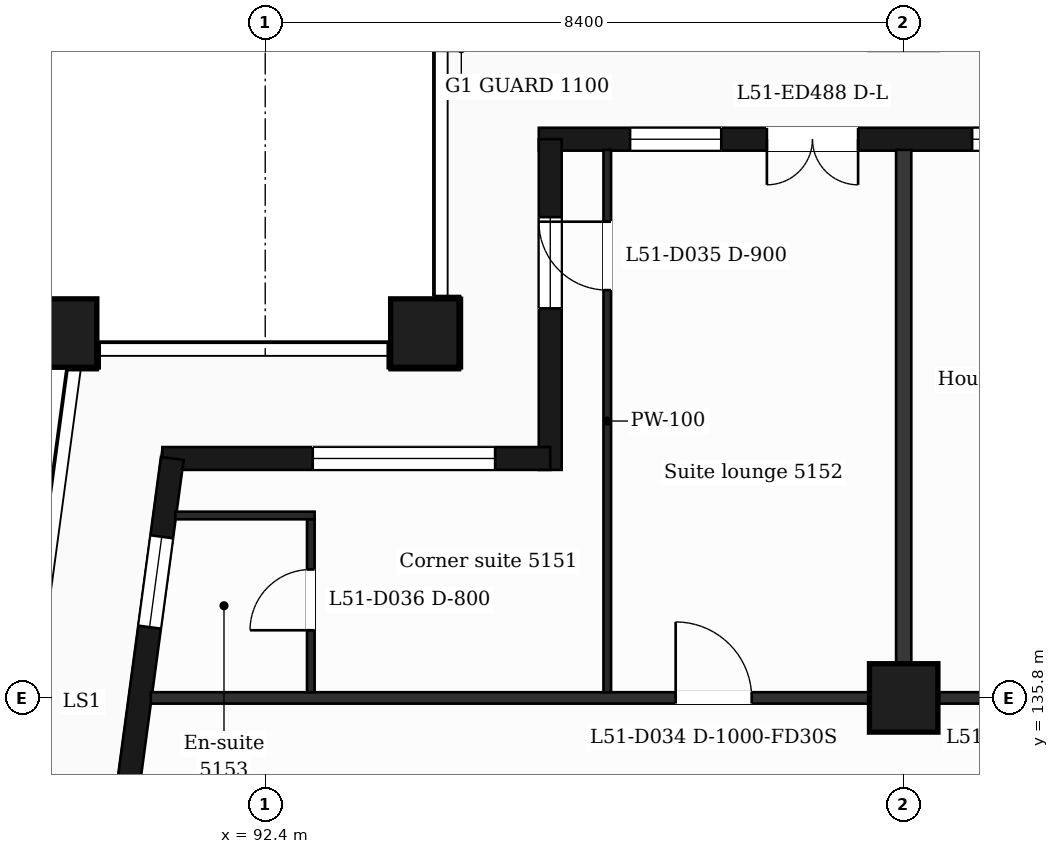
"""IFC4 building model, lengths in metres.
Left out: names, types, materials, properties, quantities, classifications, styles, units other than length and angle.
Written with IfcOpenShell. Run it as: python <this file> out.ifc"""

import sys

from ifc_helpers import new_model, si_unit, direction, frame, frame_2d, origin, origin_2d, place, context, subcontext, project, spatial, rectangle, extrude, element, fill, save


model = new_model("IFC4")
c1 = context("Model", 3, precision=1e-05, world=origin(), true_north=direction((0.0, 1.0)))
c2 = subcontext(c1, "Body", "Model", "MODEL_VIEW")
j1 = project(units=[si_unit("LENGTHUNIT", "METRE"), si_unit("PLANEANGLEUNIT", "RADIAN")], contexts=[c1])
p1 = place(None, origin())
s1 = spatial("IfcSite", under=j1, at=p1, CompositionType="ELEMENT")
p2 = place(p1, origin())
s2 = spatial("IfcBuilding", under=s1, at=p2, CompositionType="ELEMENT")
p3 = place(p2, frame((0.0, 0.0, 213.3)))
s3 = spatial("IfcBuildingStorey", under=s2, at=p3, CompositionType="ELEMENT", Elevation=213.3)
for number, where, z_axis, x_axis in (
    (1, (94.5, 140.6, 0.0), (0.0, 0.0, 1.0), (1.0, 0.0, 0.0)),
    (2, (89.735, 140.6, 0.0), (0.0, 0.0, 1.0), (1.0, 0.0, 0.0)),
    (3, (100.8, 135.8, 0.0), (0.0, 0.0, 1.0), (1.0, 0.0, 0.0)),
):
    element("IfcColumn", number, at=place(p3, frame(where, z_axis=z_axis, x_axis=x_axis)), inside=s3, PredefinedType="COLUMN", context=c2, shape_type="SweptSolid", body=[
        extrude(rectangle(XDim=0.9, YDim=0.9, at=origin_2d()), origin(), (0.0, 0.0, 1.0), 3.7),
    ])
p4 = place(p3, frame((112.5, 143.15, 0.0), z_axis=(0.0, 0.0, 1.0), x_axis=(-1.0, 0.0, 0.0)))
e4 = element("IfcWall", 4, at=p4, inside=s3, PredefinedType="SOLIDWALL", context=c2, shape_type="SweptSolid", body=[
    extrude(rectangle(XDim=16.5, YDim=0.3, at=frame_2d((8.25, 0.0))), origin(), (0.0, 0.0, 1.0), 3.38),
])
p5 = place(p4, frame((1.1, 0.0, 0.9)))
e5 = element("IfcOpeningElement", 5, at=p5, cuts=e4, PredefinedType="OPENING", context=c2, shape_type="SweptSolid", body=[
    extrude(rectangle(XDim=1.2, YDim=2.1, at=frame_2d((0.6, 1.05))), frame((0.0, 0.16, 0.0), z_axis=(0.0, -1.0, 0.0), x_axis=(1.0, 0.0, 0.0)), (0.0, 0.0, 1.0), 0.32),
])
p6 = place(p4, frame((4.2, 0.0, 0.9)))
e6 = element("IfcOpeningElement", 6, at=p6, cuts=e4, PredefinedType="OPENING", context=c2, shape_type="SweptSolid", body=[
    extrude(rectangle(XDim=2.4, YDim=2.1, at=frame_2d((1.2, 1.05))), frame((0.0, 0.16, 0.0), z_axis=(0.0, -1.0, 0.0), x_axis=(1.0, 0.0, 0.0)), (0.0, 0.0, 1.0), 0.32),
])
p7 = place(p4, frame((8.4, 0.0, 0.9)))
e7 = element("IfcOpeningElement", 7, at=p7, cuts=e4, PredefinedType="OPENING", context=c2, shape_type="SweptSolid", body=[
    extrude(rectangle(XDim=2.4, YDim=2.1, at=frame_2d((1.2, 1.05))), frame((0.0, 0.16, 0.0), z_axis=(0.0, -1.0, 0.0), x_axis=(1.0, 0.0, 0.0)), (0.0, 0.0, 1.0), 0.32),
])
p8 = place(p4, frame((12.3, 0.0, 0.0)))
e8 = element("IfcOpeningElement", 8, at=p8, cuts=e4, PredefinedType="OPENING", context=c2, shape_type="SweptSolid", body=[
    extrude(rectangle(XDim=1.2, YDim=2.4, at=frame_2d((0.6, 1.2))), frame((0.0, 0.16, 0.0), z_axis=(0.0, -1.0, 0.0), x_axis=(1.0, 0.0, 0.0)), (0.0, 0.0, 1.0), 0.32),
])
p9 = place(p4, frame((14.1, 0.0, 0.9)))
e9 = element("IfcOpeningElement", 9, at=p9, cuts=e4, PredefinedType="OPENING", context=c2, shape_type="SweptSolid", body=[
    extrude(rectangle(XDim=1.2, YDim=2.1, at=frame_2d((0.6, 1.05))), frame((0.0, 0.16, 0.0), z_axis=(0.0, -1.0, 0.0), x_axis=(1.0, 0.0, 0.0)), (0.0, 0.0, 1.0), 0.32),
])
p10 = place(p3, frame((96.15, 143.15, 0.0), z_axis=(0.0, 0.0, 1.0), x_axis=(0.0, -1.0, 0.0)))
e10 = element("IfcWall", 10, at=p10, inside=s3, PredefinedType="SOLIDWALL", context=c2, shape_type="SweptSolid", body=[
    extrude(rectangle(XDim=4.35, YDim=0.3, at=frame_2d((2.175, 0.0))), origin(), (0.0, 0.0, 1.0), 3.38),
])
p11 = place(p10, frame((1.025, 0.0, 0.9)))
e11 = element("IfcOpeningElement", 11, at=p11, cuts=e10, PredefinedType="OPENING", context=c2, shape_type="SweptSolid", body=[
    extrude(rectangle(XDim=1.2, YDim=2.1, at=frame_2d((0.6, 1.05))), frame((0.0, 0.16, 0.0), z_axis=(0.0, -1.0, 0.0), x_axis=(1.0, 0.0, 0.0)), (0.0, 0.0, 1.0), 0.32),
])
p12 = place(p3, frame((96.15, 138.95, 0.0), z_axis=(0.0, 0.0, 1.0), x_axis=(-1.0, 0.0, 0.0)))
e12 = element("IfcWall", 12, at=p12, inside=s3, PredefinedType="SOLIDWALL", context=c2, shape_type="SweptSolid", body=[
    extrude(rectangle(XDim=5.104, YDim=0.3, at=frame_2d((2.552, 0.0))), origin(), (0.0, 0.0, 1.0), 3.38),
])
p13 = place(p12, frame((0.725, 0.0, 0.9)))
e13 = element("IfcOpeningElement", 13, at=p13, cuts=e12, PredefinedType="OPENING", context=c2, shape_type="SweptSolid", body=[
    extrude(rectangle(XDim=2.4, YDim=2.1, at=frame_2d((1.2, 1.05))), frame((0.0, 0.16, 0.0), z_axis=(0.0, -1.0, 0.0), x_axis=(1.0, 0.0, 0.0)), (0.0, 0.0, 1.0), 0.32),
])
p14 = place(p3, frame((91.177, 138.95, 0.0), z_axis=(0.0, 0.0, 1.0), x_axis=(-0.133426664613, -0.991058689065, 0.0)))
e14 = element("IfcWall", 14, at=p14, inside=s3, PredefinedType="SOLIDWALL", context=c2, shape_type="SweptSolid", body=[
    extrude(rectangle(XDim=6.609, YDim=0.3, at=frame_2d((3.305, 0.0))), origin(), (0.0, 0.0, 1.0), 3.38),
])
p15 = place(p14, frame((1.039, 0.0, 0.9)))
e15 = element("IfcOpeningElement", 15, at=p15, cuts=e14, PredefinedType="OPENING", context=c2, shape_type="SweptSolid", body=[
    extrude(rectangle(XDim=1.2, YDim=2.1, at=frame_2d((0.6, 1.05))), frame((0.0, 0.16, 0.0), z_axis=(0.0, -1.0, 0.0), x_axis=(1.0, 0.0, 0.0)), (0.0, 0.0, 1.0), 0.32),
])
p16 = place(p14, frame((4.294, 0.0, 0.0)))
e16 = element("IfcOpeningElement", 16, at=p16, cuts=e14, PredefinedType="OPENING", context=c2, shape_type="SweptSolid", body=[
    extrude(rectangle(XDim=1.2, YDim=2.4, at=frame_2d((0.6, 1.2))), frame((0.0, 0.16, 0.0), z_axis=(0.0, -1.0, 0.0), x_axis=(1.0, 0.0, 0.0)), (0.0, 0.0, 1.0), 0.32),
])
p17 = place(p3, frame((90.895, 135.8, 0.0), z_axis=(0.0, 0.0, 1.0), x_axis=(1.0, 0.0, 0.0)))
e17 = element("IfcWall", 17, at=p17, inside=s3, PredefinedType="PARTITIONING", context=c2, shape_type="SweptSolid", body=[
    extrude(rectangle(XDim=45.011, YDim=0.15, at=frame_2d((22.505, 0.0))), origin(), (0.0, 0.0, 1.0), 3.38),
])
p18 = place(p17, frame((6.906, 0.0, 0.0)))
e18 = element("IfcOpeningElement", 18, at=p18, cuts=e17, PredefinedType="OPENING", context=c2, shape_type="SweptSolid", body=[
    extrude(rectangle(XDim=1.0, YDim=2.1, at=frame_2d((0.5, 1.05))), frame((0.0, 0.085, 0.0), z_axis=(0.0, -1.0, 0.0), x_axis=(1.0, 0.0, 0.0)), (0.0, 0.0, 1.0), 0.17),
])
p19 = place(p17, frame((11.531, 0.0, 0.0)))
e19 = element("IfcOpeningElement", 19, at=p19, cuts=e17, PredefinedType="OPENING", context=c2, shape_type="SweptSolid", body=[
    extrude(rectangle(XDim=0.95, YDim=2.1, at=frame_2d((0.475, 1.05))), frame((0.0, 0.085, 0.0), z_axis=(0.0, -1.0, 0.0), x_axis=(1.0, 0.0, 0.0)), (0.0, 0.0, 1.0), 0.17),
])
p20 = place(p17, frame((16.667, 0.0, 0.0)))
e20 = element("IfcOpeningElement", 20, at=p20, cuts=e17, PredefinedType="OPENING", context=c2, shape_type="SweptSolid", body=[
    extrude(rectangle(XDim=0.95, YDim=2.1, at=frame_2d((0.475, 1.05))), frame((0.0, 0.085, 0.0), z_axis=(0.0, -1.0, 0.0), x_axis=(1.0, 0.0, 0.0)), (0.0, 0.0, 1.0), 0.17),
])
p21 = place(p17, frame((21.281, 0.0, 0.0)))
e21 = element("IfcOpeningElement", 21, at=p21, cuts=e17, PredefinedType="OPENING", context=c2, shape_type="SweptSolid", body=[
    extrude(rectangle(XDim=0.95, YDim=2.1, at=frame_2d((0.475, 1.05))), frame((0.0, 0.085, 0.0), z_axis=(0.0, -1.0, 0.0), x_axis=(1.0, 0.0, 0.0)), (0.0, 0.0, 1.0), 0.17),
])
p22 = place(p17, frame((28.73, 0.0, 0.0)))
e22 = element("IfcOpeningElement", 22, at=p22, cuts=e17, PredefinedType="OPENING", context=c2, shape_type="SweptSolid", body=[
    extrude(rectangle(XDim=1.0, YDim=2.1, at=frame_2d((0.5, 1.05))), frame((0.0, 0.085, 0.0), z_axis=(0.0, -1.0, 0.0), x_axis=(1.0, 0.0, 0.0)), (0.0, 0.0, 1.0), 0.17),
])
p23 = place(p17, frame((39.814, 0.0, 0.0)))
e23 = element("IfcOpeningElement", 23, at=p23, cuts=e17, PredefinedType="OPENING", context=c2, shape_type="SweptSolid", body=[
    extrude(rectangle(XDim=0.95, YDim=2.1, at=frame_2d((0.475, 1.05))), frame((0.0, 0.085, 0.0), z_axis=(0.0, -1.0, 0.0), x_axis=(1.0, 0.0, 0.0)), (0.0, 0.0, 1.0), 0.17),
])
p24 = place(p3, frame((91.218, 138.2, 0.0), z_axis=(0.0, 0.0, 1.0), x_axis=(1.0, 0.0, 0.0)))
e24 = element("IfcWall", 24, at=p24, inside=s3, PredefinedType="PARTITIONING", context=c2, shape_type="SweptSolid", body=[
    extrude(rectangle(XDim=1.832, YDim=0.1, at=frame_2d((0.916, 0.0))), origin(), (0.0, 0.0, 1.0), 3.38),
])
p25 = place(p3, frame((93.0, 135.875, 0.0), z_axis=(0.0, 0.0, 1.0), x_axis=(0.0, 1.0, 0.0)))
e25 = element("IfcWall", 25, at=p25, inside=s3, PredefinedType="PARTITIONING", context=c2, shape_type="SweptSolid", body=[
    extrude(rectangle(XDim=2.275, YDim=0.1, at=frame_2d((1.137, 0.0))), origin(), (0.0, 0.0, 1.0), 3.38),
])
p26 = place(p25, frame((0.815, 0.0, 0.0)))
e26 = element("IfcOpeningElement", 26, at=p26, cuts=e25, PredefinedType="OPENING", context=c2, shape_type="SweptSolid", body=[
    extrude(rectangle(XDim=0.8, YDim=2.1, at=frame_2d((0.4, 1.05))), frame((0.0, 0.06, 0.0), z_axis=(0.0, -1.0, 0.0), x_axis=(1.0, 0.0, 0.0)), (0.0, 0.0, 1.0), 0.12),
])
p27 = place(p3, frame((96.9, 135.875, 0.0), z_axis=(0.0, 0.0, 1.0), x_axis=(0.0, 1.0, 0.0)))
e27 = element("IfcWall", 27, at=p27, inside=s3, PredefinedType="PARTITIONING", context=c2, shape_type="SweptSolid", body=[
    extrude(rectangle(XDim=7.135, YDim=0.1, at=frame_2d((3.567, 0.0))), origin(), (0.0, 0.0, 1.0), 3.38),
])
p28 = place(p27, frame((5.29, 0.0, 0.0)))
e28 = element("IfcOpeningElement", 28, at=p28, cuts=e27, PredefinedType="OPENING", context=c2, shape_type="SweptSolid", body=[
    extrude(rectangle(XDim=0.9, YDim=2.1, at=frame_2d((0.45, 1.05))), frame((0.0, 0.06, 0.0), z_axis=(0.0, -1.0, 0.0), x_axis=(1.0, 0.0, 0.0)), (0.0, 0.0, 1.0), 0.12),
])
p29 = place(p3, frame((100.8, 135.875, 0.0), z_axis=(0.0, 0.0, 1.0), x_axis=(0.0, 1.0, 0.0)))
e29 = element("IfcWall", 29, at=p29, inside=s3, PredefinedType="PARTITIONING", context=c2, shape_type="SweptSolid", body=[
    extrude(rectangle(XDim=7.135, YDim=0.2, at=frame_2d((3.567, 0.0))), origin(), (0.0, 0.0, 1.0), 3.38),
])
p30 = place(p7, origin())
e30 = element("IfcWindow", 30, at=p30, inside=s3, PartitioningType="SINGLE_PANEL", PredefinedType="WINDOW", context=c2, shape_type="SweptSolid", body=[
    extrude(rectangle(XDim=2.4, YDim=2.1, at=frame_2d((1.2, 1.05))), frame((0.0, 0.03, 0.0), z_axis=(0.0, -1.0, 0.0), x_axis=(1.0, 0.0, 0.0)), (0.0, 0.0, 1.0), 0.06),
])
fill(e7, e30)
p31 = place(p8, origin())
e31 = element("IfcDoor", 31, at=p31, inside=s3, OperationType="DOUBLE_DOOR_SINGLE_SWING", PredefinedType="DOOR", context=c2, shape_type="SweptSolid", body=[
    extrude(rectangle(XDim=1.2, YDim=2.4, at=frame_2d((0.6, 1.2))), frame((0.0, 0.025, 0.0), z_axis=(0.0, -1.0, 0.0), x_axis=(1.0, 0.0, 0.0)), (0.0, 0.0, 1.0), 0.05),
])
fill(e8, e31)
p32 = place(p9, origin())
e32 = element("IfcWindow", 32, at=p32, inside=s3, PartitioningType="SINGLE_PANEL", PredefinedType="WINDOW", context=c2, shape_type="SweptSolid", body=[
    extrude(rectangle(XDim=1.2, YDim=2.1, at=frame_2d((0.6, 1.05))), frame((0.0, 0.03, 0.0), z_axis=(0.0, -1.0, 0.0), x_axis=(1.0, 0.0, 0.0)), (0.0, 0.0, 1.0), 0.06),
])
fill(e9, e32)
p33 = place(p11, origin())
e33 = element("IfcWindow", 33, at=p33, inside=s3, PartitioningType="SINGLE_PANEL", PredefinedType="WINDOW", context=c2, shape_type="SweptSolid", body=[
    extrude(rectangle(XDim=1.2, YDim=2.1, at=frame_2d((0.6, 1.05))), frame((0.0, 0.03, 0.0), z_axis=(0.0, -1.0, 0.0), x_axis=(1.0, 0.0, 0.0)), (0.0, 0.0, 1.0), 0.06),
])
fill(e11, e33)
p34 = place(p13, origin())
e34 = element("IfcWindow", 34, at=p34, inside=s3, PartitioningType="SINGLE_PANEL", PredefinedType="WINDOW", context=c2, shape_type="SweptSolid", body=[
    extrude(rectangle(XDim=2.4, YDim=2.1, at=frame_2d((1.2, 1.05))), frame((0.0, 0.03, 0.0), z_axis=(0.0, -1.0, 0.0), x_axis=(1.0, 0.0, 0.0)), (0.0, 0.0, 1.0), 0.06),
])
fill(e13, e34)
p35 = place(p15, origin())
e35 = element("IfcWindow", 35, at=p35, inside=s3, PartitioningType="SINGLE_PANEL", PredefinedType="WINDOW", context=c2, shape_type="SweptSolid", body=[
    extrude(rectangle(XDim=1.2, YDim=2.1, at=frame_2d((0.6, 1.05))), frame((0.0, 0.03, 0.0), z_axis=(0.0, -1.0, 0.0), x_axis=(1.0, 0.0, 0.0)), (0.0, 0.0, 1.0), 0.06),
])
fill(e15, e35)
p36 = place(p18, origin())
e36 = element("IfcDoor", 36, at=p36, inside=s3, OperationType="SINGLE_SWING_LEFT", PredefinedType="DOOR", context=c2, shape_type="SweptSolid", body=[
    extrude(rectangle(XDim=1.0, YDim=2.1, at=frame_2d((0.5, 1.05))), frame((0.0, 0.025, 0.0), z_axis=(0.0, -1.0, 0.0), x_axis=(1.0, 0.0, 0.0)), (0.0, 0.0, 1.0), 0.05),
])
fill(e18, e36)
p37 = place(p28, origin())
e37 = element("IfcDoor", 37, at=p37, inside=s3, OperationType="SINGLE_SWING_RIGHT", PredefinedType="DOOR", context=c2, shape_type="SweptSolid", body=[
    extrude(rectangle(XDim=0.9, YDim=2.1, at=frame_2d((0.45, 1.05))), frame((0.0, 0.025, 0.0), z_axis=(0.0, -1.0, 0.0), x_axis=(1.0, 0.0, 0.0)), (0.0, 0.0, 1.0), 0.05),
])
fill(e28, e37)
p38 = place(p26, origin())
e38 = element("IfcDoor", 38, at=p38, inside=s3, OperationType="SINGLE_SWING_LEFT", PredefinedType="DOOR", context=c2, shape_type="SweptSolid", body=[
    extrude(rectangle(XDim=0.8, YDim=2.1, at=frame_2d((0.4, 1.05))), frame((0.0, 0.025, 0.0), z_axis=(0.0, -1.0, 0.0), x_axis=(1.0, 0.0, 0.0)), (0.0, 0.0, 1.0), 0.05),
])
fill(e26, e38)
save(model, sys.argv[1])
